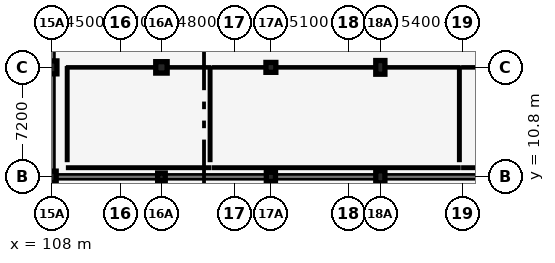
"""IFC4 building model, lengths in metres.
Left out: names, types, materials, properties, quantities, classifications, styles, units other than length and angle.
Written with IfcOpenShell. Run it as: python <this file> out.ifc"""

import sys

from ifc_helpers import new_model, si_unit, direction, frame, frame_2d, origin, origin_2d, place, context, subcontext, project, spatial, rectangle, circle, extrude, element, fill, save


model = new_model("IFC4")
c1 = context("Model", 3, precision=1e-05, world=origin(), true_north=direction((0.0, 1.0)))
c2 = subcontext(c1, "Body", "Model", "MODEL_VIEW")
j1 = project(units=[si_unit("LENGTHUNIT", "METRE"), si_unit("PLANEANGLEUNIT", "RADIAN")], contexts=[c1])
p1 = place(None, origin())
s1 = spatial("IfcSite", under=j1, at=p1, CompositionType="ELEMENT")
p2 = place(p1, origin())
s2 = spatial("IfcBuilding", under=s1, at=p2, CompositionType="ELEMENT")
p3 = place(p2, origin())
s3 = spatial("IfcBuildingStorey", under=s2, at=p3, CompositionType="ELEMENT", Elevation=0.0)
p4 = place(p3, frame((108.0, 10.8, 0.0), z_axis=(0.0, 0.0, 1.0), x_axis=(1.0, 0.0, 0.0)))
e1 = element("IfcColumn", 1, at=p4, inside=s3, PredefinedType="COLUMN", context=c2, shape_type="SweptSolid", body=[
    extrude(rectangle(XDim=0.55, YDim=0.75, at=origin_2d()), origin(), (0.0, 0.0, 1.0), 4.8),
])
p5 = place(p3, frame((108.0, 18.0, 0.0), z_axis=(0.0, 0.0, 1.0), x_axis=(1.0, 0.0, 0.0)))
e2 = element("IfcColumn", 2, at=p5, inside=s3, PredefinedType="COLUMN", context=c2, shape_type="SweptSolid", body=[
    extrude(rectangle(XDim=0.65, YDim=0.85, at=origin_2d()), origin(), (0.0, 0.0, 1.0), 4.8),
])
p6 = place(p3, frame((115.2, 10.8, 0.0), z_axis=(0.0, 0.0, 1.0), x_axis=(1.0, 0.0, 0.0)))
e3 = element("IfcColumn", 3, at=p6, inside=s3, PredefinedType="COLUMN", context=c2, shape_type="SweptSolid", body=[
    extrude(circle(Radius=0.25, at=origin_2d()), origin(), (0.0, 0.0, 1.0), 4.8),
])
p7 = place(p3, frame((115.2, 18.0, 0.0), z_axis=(0.0, 0.0, 1.0), x_axis=(1.0, 0.0, 0.0)))
e4 = element("IfcColumn", 4, at=p7, inside=s3, PredefinedType="COLUMN", context=c2, shape_type="SweptSolid", body=[
    extrude(circle(Radius=0.375, at=origin_2d()), origin(), (0.0, 0.0, 1.0), 4.8),
])
p8 = place(p3, frame((122.4, 10.8, 0.0), z_axis=(0.0, 0.0, 1.0), x_axis=(1.0, 0.0, 0.0)))
e5 = element("IfcColumn", 5, at=p8, inside=s3, PredefinedType="COLUMN", context=c2, shape_type="SweptSolid", body=[
    extrude(rectangle(XDim=0.6, YDim=0.6, at=origin_2d()), origin(), (0.0, 0.0, 1.0), 4.8),
])
p9 = place(p3, frame((122.4, 18.0, 0.0), z_axis=(0.0, 0.0, 1.0), x_axis=(1.0, 0.0, 0.0)))
e6 = element("IfcColumn", 6, at=p9, inside=s3, PredefinedType="COLUMN", context=c2, shape_type="SweptSolid", body=[
    extrude(rectangle(XDim=0.65, YDim=0.65, at=origin_2d()), origin(), (0.0, 0.0, 1.0), 4.8),
])
p10 = place(p3, frame((129.6, 10.8, 0.0), z_axis=(0.0, 0.0, 1.0), x_axis=(1.0, 0.0, 0.0)))
e7 = element("IfcColumn", 7, at=p10, inside=s3, PredefinedType="COLUMN", context=c2, shape_type="SweptSolid", body=[
    extrude(rectangle(XDim=0.6, YDim=0.8, at=origin_2d()), origin(), (0.0, 0.0, 1.0), 4.8),
])
p11 = place(p3, frame((129.6, 18.0, 0.0), z_axis=(0.0, 0.0, 1.0), x_axis=(1.0, 0.0, 0.0)))
e8 = element("IfcColumn", 8, at=p11, inside=s3, PredefinedType="COLUMN", context=c2, shape_type="SweptSolid", body=[
    extrude(rectangle(XDim=0.6, YDim=0.9, at=origin_2d()), origin(), (0.0, 0.0, 1.0), 4.8),
])
p12 = place(p3, frame((108.0, 10.8, 0.0), z_axis=(0.0, 0.0, 1.0), x_axis=(1.0, 0.0, 0.0)))
e9 = element("IfcWall", 9, at=p12, inside=s3, PredefinedType="SOLIDWALL", context=c2, shape_type="SweptSolid", body=[
    extrude(rectangle(XDim=79.2, YDim=0.32, at=frame_2d((39.6, 0.0))), origin(), (0.0, 0.0, 1.0), 4.25),
])
p13 = place(p12, frame((2.2, 0.0, 0.72)))
e10 = element("IfcOpeningElement", 10, at=p13, cuts=e9, PredefinedType="OPENING", context=c2, shape_type="SweptSolid", body=[
    extrude(rectangle(XDim=1.8, YDim=2.15, at=frame_2d((0.9, 1.075))), frame((0.0, 0.17, 0.0), z_axis=(0.0, -1.0, 0.0), x_axis=(1.0, 0.0, 0.0)), (0.0, 0.0, 1.0), 0.34),
])
p14 = place(p12, frame((9.4, 0.0, 0.72)))
e11 = element("IfcOpeningElement", 11, at=p14, cuts=e9, PredefinedType="OPENING", context=c2, shape_type="SweptSolid", body=[
    extrude(rectangle(XDim=1.2, YDim=2.0, at=frame_2d((0.6, 1.0))), frame((0.0, 0.17, 0.0), z_axis=(0.0, -1.0, 0.0), x_axis=(1.0, 0.0, 0.0)), (0.0, 0.0, 1.0), 0.34),
])
p15 = place(p12, frame((16.6, 0.0, 0.72)))
e12 = element("IfcOpeningElement", 12, at=p15, cuts=e9, PredefinedType="OPENING", context=c2, shape_type="SweptSolid", body=[
    extrude(rectangle(XDim=1.35, YDim=2.05, at=frame_2d((0.675, 1.025))), frame((0.0, 0.17, 0.0), z_axis=(0.0, -1.0, 0.0), x_axis=(1.0, 0.0, 0.0)), (0.0, 0.0, 1.0), 0.34),
])
p16 = place(p12, frame((23.8, 0.0, 0.72)))
e13 = element("IfcOpeningElement", 13, at=p16, cuts=e9, PredefinedType="OPENING", context=c2, shape_type="SweptSolid", body=[
    extrude(rectangle(XDim=1.5, YDim=2.1, at=frame_2d((0.75, 1.05))), frame((0.0, 0.17, 0.0), z_axis=(0.0, -1.0, 0.0), x_axis=(1.0, 0.0, 0.0)), (0.0, 0.0, 1.0), 0.34),
])
p17 = place(p12, frame((31.0, 0.0, 0.72)))
e14 = element("IfcOpeningElement", 14, at=p17, cuts=e9, PredefinedType="OPENING", context=c2, shape_type="SweptSolid", body=[
    extrude(rectangle(XDim=1.65, YDim=2.1, at=frame_2d((0.825, 1.05))), frame((0.0, 0.17, 0.0), z_axis=(0.0, -1.0, 0.0), x_axis=(1.0, 0.0, 0.0)), (0.0, 0.0, 1.0), 0.34),
])
p18 = place(p12, frame((38.2, 0.0, 0.72)))
e15 = element("IfcOpeningElement", 15, at=p18, cuts=e9, PredefinedType="OPENING", context=c2, shape_type="SweptSolid", body=[
    extrude(rectangle(XDim=1.8, YDim=2.15, at=frame_2d((0.9, 1.075))), frame((0.0, 0.17, 0.0), z_axis=(0.0, -1.0, 0.0), x_axis=(1.0, 0.0, 0.0)), (0.0, 0.0, 1.0), 0.34),
])
p19 = place(p12, frame((45.4, 0.0, 0.72)))
e16 = element("IfcOpeningElement", 16, at=p19, cuts=e9, PredefinedType="OPENING", context=c2, shape_type="SweptSolid", body=[
    extrude(rectangle(XDim=1.2, YDim=2.0, at=frame_2d((0.6, 1.0))), frame((0.0, 0.17, 0.0), z_axis=(0.0, -1.0, 0.0), x_axis=(1.0, 0.0, 0.0)), (0.0, 0.0, 1.0), 0.34),
])
p20 = place(p12, frame((52.6, 0.0, 0.72)))
e17 = element("IfcOpeningElement", 17, at=p20, cuts=e9, PredefinedType="OPENING", context=c2, shape_type="SweptSolid", body=[
    extrude(rectangle(XDim=1.35, YDim=2.05, at=frame_2d((0.675, 1.025))), frame((0.0, 0.17, 0.0), z_axis=(0.0, -1.0, 0.0), x_axis=(1.0, 0.0, 0.0)), (0.0, 0.0, 1.0), 0.34),
])
p21 = place(p12, frame((59.8, 0.0, 0.72)))
e18 = element("IfcOpeningElement", 18, at=p21, cuts=e9, PredefinedType="OPENING", context=c2, shape_type="SweptSolid", body=[
    extrude(rectangle(XDim=1.5, YDim=2.1, at=frame_2d((0.75, 1.05))), frame((0.0, 0.17, 0.0), z_axis=(0.0, -1.0, 0.0), x_axis=(1.0, 0.0, 0.0)), (0.0, 0.0, 1.0), 0.34),
])
p22 = place(p12, frame((67.0, 0.0, 0.72)))
e19 = element("IfcOpeningElement", 19, at=p22, cuts=e9, PredefinedType="OPENING", context=c2, shape_type="SweptSolid", body=[
    extrude(rectangle(XDim=1.65, YDim=2.1, at=frame_2d((0.825, 1.05))), frame((0.0, 0.17, 0.0), z_axis=(0.0, -1.0, 0.0), x_axis=(1.0, 0.0, 0.0)), (0.0, 0.0, 1.0), 0.34),
])
p23 = place(p3, frame((108.0, 54.0, 0.0), z_axis=(0.0, 0.0, 1.0), x_axis=(0.0, -1.0, 0.0)))
e20 = element("IfcWall", 20, at=p23, inside=s3, PredefinedType="SOLIDWALL", context=c2, shape_type="SweptSolid", body=[
    extrude(rectangle(XDim=43.2, YDim=0.32, at=frame_2d((21.6, 0.0))), origin(), (0.0, 0.0, 1.0), 4.25),
])
p24 = place(p23, frame((2.2, 0.0, 0.72)))
e21 = element("IfcOpeningElement", 21, at=p24, cuts=e20, PredefinedType="OPENING", context=c2, shape_type="SweptSolid", body=[
    extrude(rectangle(XDim=1.2, YDim=2.0, at=frame_2d((0.6, 1.0))), frame((0.0, 0.17, 0.0), z_axis=(0.0, -1.0, 0.0), x_axis=(1.0, 0.0, 0.0)), (0.0, 0.0, 1.0), 0.34),
])
p25 = place(p23, frame((16.6, 0.0, 0.72)))
e22 = element("IfcOpeningElement", 22, at=p25, cuts=e20, PredefinedType="OPENING", context=c2, shape_type="SweptSolid", body=[
    extrude(rectangle(XDim=1.5, YDim=2.1, at=frame_2d((0.75, 1.05))), frame((0.0, 0.17, 0.0), z_axis=(0.0, -1.0, 0.0), x_axis=(1.0, 0.0, 0.0)), (0.0, 0.0, 1.0), 0.34),
])
p26 = place(p23, frame((23.8, 0.0, 0.72)))
e23 = element("IfcOpeningElement", 23, at=p26, cuts=e20, PredefinedType="OPENING", context=c2, shape_type="SweptSolid", body=[
    extrude(rectangle(XDim=1.65, YDim=2.1, at=frame_2d((0.825, 1.05))), frame((0.0, 0.17, 0.0), z_axis=(0.0, -1.0, 0.0), x_axis=(1.0, 0.0, 0.0)), (0.0, 0.0, 1.0), 0.34),
])
p27 = place(p23, frame((31.0, 0.0, 0.72)))
e24 = element("IfcOpeningElement", 24, at=p27, cuts=e20, PredefinedType="OPENING", context=c2, shape_type="SweptSolid", body=[
    extrude(rectangle(XDim=1.8, YDim=2.15, at=frame_2d((0.9, 1.075))), frame((0.0, 0.17, 0.0), z_axis=(0.0, -1.0, 0.0), x_axis=(1.0, 0.0, 0.0)), (0.0, 0.0, 1.0), 0.34),
])
p28 = place(p23, frame((6.2, 0.0, 0.0)))
e25 = element("IfcOpeningElement", 25, at=p28, cuts=e20, PredefinedType="OPENING", context=c2, shape_type="SweptSolid", body=[
    extrude(rectangle(XDim=2.0, YDim=2.35, at=frame_2d((1.0, 1.175))), frame((0.0, 0.17, 0.0), z_axis=(0.0, -1.0, 0.0), x_axis=(1.0, 0.0, 0.0)), (0.0, 0.0, 1.0), 0.34),
])
p29 = place(p3, frame((118.4, 11.4, 0.0), z_axis=(0.0, 0.0, 1.0), x_axis=(-1.0, 0.0, 0.0)))
e26 = element("IfcWall", 26, at=p29, inside=s3, PredefinedType="PARTITIONING", context=c2, shape_type="SweptSolid", body=[
    extrude(rectangle(XDim=9.4, YDim=0.15, at=frame_2d((4.7, 0.0))), origin(), (0.0, 0.0, 1.0), 3.857),
])
p30 = place(p3, frame((118.4, 11.85, 0.0), z_axis=(0.0, 0.0, 1.0), x_axis=(0.0, 1.0, 0.0)))
e27 = element("IfcWall", 27, at=p30, inside=s3, PredefinedType="PARTITIONING", context=c2, shape_type="SweptSolid", body=[
    extrude(rectangle(XDim=6.15, YDim=0.15, at=frame_2d((3.075, 0.0))), origin(), (0.0, 0.0, 1.0), 3.857),
])
p31 = place(p3, frame((109.0, 18.0, 0.0), z_axis=(0.0, 0.0, 1.0), x_axis=(0.0, -1.0, 0.0)))
e28 = element("IfcWall", 28, at=p31, inside=s3, PredefinedType="PARTITIONING", context=c2, shape_type="SweptSolid", body=[
    extrude(rectangle(XDim=6.15, YDim=0.15, at=frame_2d((3.075, 0.0))), origin(), (0.0, 0.0, 1.0), 3.957),
])
p32 = place(p3, frame((109.0, 18.0, 0.0), z_axis=(0.0, 0.0, 1.0), x_axis=(1.0, 0.0, 0.0)))
e29 = element("IfcWall", 29, at=p32, inside=s3, PredefinedType="PARTITIONING", context=c2, shape_type="SweptSolid", body=[
    extrude(rectangle(XDim=9.4, YDim=0.125, at=frame_2d((4.7, 0.0))), origin(), (0.0, 0.0, 1.0), 3.857),
])
p33 = place(p32, frame((4.215, 0.0, 0.0)))
e30 = element("IfcOpeningElement", 30, at=p33, cuts=e29, PredefinedType="OPENING", context=c2, shape_type="SweptSolid", body=[
    extrude(rectangle(XDim=0.97, YDim=2.15, at=frame_2d((0.485, 1.075))), frame((0.0, 0.073, 0.0), z_axis=(0.0, -1.0, 0.0), x_axis=(1.0, 0.0, 0.0)), (0.0, 0.0, 1.0), 0.145),
])
p34 = place(p3, frame((134.8, 11.4, 0.0), z_axis=(0.0, 0.0, 1.0), x_axis=(-1.0, 0.0, 0.0)))
e31 = element("IfcWall", 31, at=p34, inside=s3, PredefinedType="PARTITIONING", context=c2, shape_type="SweptSolid", body=[
    extrude(rectangle(XDim=16.2, YDim=0.15, at=frame_2d((8.1, 0.0))), origin(), (0.0, 0.0, 1.0), 3.557),
])
p35 = place(p3, frame((134.8, 11.85, 0.0), z_axis=(0.0, 0.0, 1.0), x_axis=(0.0, 1.0, 0.0)))
e32 = element("IfcWall", 32, at=p35, inside=s3, PredefinedType="PARTITIONING", context=c2, shape_type="SweptSolid", body=[
    extrude(rectangle(XDim=6.15, YDim=0.15, at=frame_2d((3.075, 0.0))), origin(), (0.0, 0.0, 1.0), 3.757),
])
p36 = place(p3, frame((118.6, 18.0, 0.0), z_axis=(0.0, 0.0, 1.0), x_axis=(1.0, 0.0, 0.0)))
e33 = element("IfcWall", 33, at=p36, inside=s3, PredefinedType="PARTITIONING", context=c2, shape_type="SweptSolid", body=[
    extrude(rectangle(XDim=16.2, YDim=0.125, at=frame_2d((8.1, 0.0))), origin(), (0.0, 0.0, 1.0), 3.757),
])
p37 = place(p36, frame((7.62, 0.0, 0.0)))
e34 = element("IfcOpeningElement", 34, at=p37, cuts=e33, PredefinedType="OPENING", context=c2, shape_type="SweptSolid", body=[
    extrude(rectangle(XDim=0.96, YDim=2.15, at=frame_2d((0.48, 1.075))), frame((0.0, 0.073, 0.0), z_axis=(0.0, -1.0, 0.0), x_axis=(1.0, 0.0, 0.0)), (0.0, 0.0, 1.0), 0.145),
])
p38 = place(p3, frame((154.0, 11.4, 0.0), z_axis=(0.0, 0.0, 1.0), x_axis=(-1.0, 0.0, 0.0)))
e35 = element("IfcWall", 35, at=p38, inside=s3, PredefinedType="PARTITIONING", context=c2, shape_type="SweptSolid", body=[
    extrude(rectangle(XDim=19.0, YDim=0.15, at=frame_2d((9.5, 0.0))), origin(), (0.0, 0.0, 1.0), 3.857),
])
p39 = place(p3, frame((135.0, 18.0, 0.0), z_axis=(0.0, 0.0, 1.0), x_axis=(1.0, 0.0, 0.0)))
e36 = element("IfcWall", 36, at=p39, inside=s3, PredefinedType="PARTITIONING", context=c2, shape_type="SweptSolid", body=[
    extrude(rectangle(XDim=19.0, YDim=0.125, at=frame_2d((9.5, 0.0))), origin(), (0.0, 0.0, 1.0), 3.657),
])
p40 = place(p39, frame((5.16, 0.0, 0.0)))
e37 = element("IfcOpeningElement", 37, at=p40, cuts=e36, PredefinedType="OPENING", context=c2, shape_type="SweptSolid", body=[
    extrude(rectangle(XDim=1.8, YDim=2.2, at=frame_2d((0.9, 1.1))), frame((0.0, 0.073, 0.0), z_axis=(0.0, -1.0, 0.0), x_axis=(1.0, 0.0, 0.0)), (0.0, 0.0, 1.0), 0.145),
])
p41 = place(p13, origin())
e38 = element("IfcWindow", 38, at=p41, inside=s3, PartitioningType="SINGLE_PANEL", PredefinedType="WINDOW", context=c2, shape_type="SweptSolid", body=[
    extrude(rectangle(XDim=1.8, YDim=2.15, at=frame_2d((0.9, 1.075))), frame((0.0, 0.03, 0.0), z_axis=(0.0, -1.0, 0.0), x_axis=(1.0, 0.0, 0.0)), (0.0, 0.0, 1.0), 0.06),
])
fill(e10, e38)
p42 = place(p14, origin())
e39 = element("IfcWindow", 39, at=p42, inside=s3, PartitioningType="SINGLE_PANEL", PredefinedType="WINDOW", context=c2, shape_type="SweptSolid", body=[
    extrude(rectangle(XDim=1.2, YDim=2.0, at=frame_2d((0.6, 1.0))), frame((0.0, 0.03, 0.0), z_axis=(0.0, -1.0, 0.0), x_axis=(1.0, 0.0, 0.0)), (0.0, 0.0, 1.0), 0.06),
])
fill(e11, e39)
p43 = place(p15, origin())
e40 = element("IfcWindow", 40, at=p43, inside=s3, PartitioningType="SINGLE_PANEL", PredefinedType="WINDOW", context=c2, shape_type="SweptSolid", body=[
    extrude(rectangle(XDim=1.35, YDim=2.05, at=frame_2d((0.675, 1.025))), frame((0.0, 0.03, 0.0), z_axis=(0.0, -1.0, 0.0), x_axis=(1.0, 0.0, 0.0)), (0.0, 0.0, 1.0), 0.06),
])
fill(e12, e40)
p44 = place(p16, origin())
e41 = element("IfcWindow", 41, at=p44, inside=s3, PartitioningType="SINGLE_PANEL", PredefinedType="WINDOW", context=c2, shape_type="SweptSolid", body=[
    extrude(rectangle(XDim=1.5, YDim=2.1, at=frame_2d((0.75, 1.05))), frame((0.0, 0.03, 0.0), z_axis=(0.0, -1.0, 0.0), x_axis=(1.0, 0.0, 0.0)), (0.0, 0.0, 1.0), 0.06),
])
fill(e13, e41)
p45 = place(p33, origin())
e42 = element("IfcDoor", 42, at=p45, inside=s3, OperationType="SINGLE_SWING_RIGHT", PredefinedType="DOOR", context=c2, shape_type="SweptSolid", body=[
    extrude(rectangle(XDim=0.97, YDim=2.15, at=frame_2d((0.485, 1.075))), frame((0.0, 0.025, 0.0), z_axis=(0.0, -1.0, 0.0), x_axis=(1.0, 0.0, 0.0)), (0.0, 0.0, 1.0), 0.05),
])
fill(e30, e42)
p46 = place(p37, origin())
e43 = element("IfcDoor", 43, at=p46, inside=s3, OperationType="SINGLE_SWING_LEFT", PredefinedType="DOOR", context=c2, shape_type="SweptSolid", body=[
    extrude(rectangle(XDim=0.96, YDim=2.15, at=frame_2d((0.48, 1.075))), frame((0.0, 0.025, 0.0), z_axis=(0.0, -1.0, 0.0), x_axis=(1.0, 0.0, 0.0)), (0.0, 0.0, 1.0), 0.05),
])
fill(e34, e43)
save(model, sys.argv[1])
